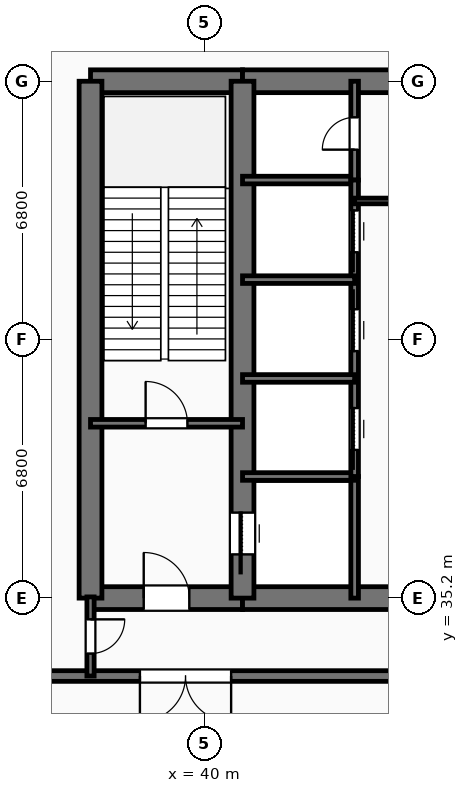
"""IFC4 building model, lengths in metres.
Left out: names, types, materials, properties, quantities, classifications, styles, units other than length and angle.
Written with IfcOpenShell. Run it as: python <this file> out.ifc"""

import sys

from ifc_helpers import new_model, si_unit, direction, frame, frame_2d, origin, place, context, subcontext, project, spatial, rectangle, extrude, element, fill, save


model = new_model("IFC4")
c1 = context("Model", 3, precision=1e-05, world=origin(), true_north=direction((0.0, 1.0)))
c2 = subcontext(c1, "Body", "Model", "MODEL_VIEW")
j1 = project(units=[si_unit("LENGTHUNIT", "METRE"), si_unit("PLANEANGLEUNIT", "RADIAN")], contexts=[c1])
p1 = place(None, origin())
s1 = spatial("IfcSite", under=j1, at=p1, CompositionType="ELEMENT")
p2 = place(p1, origin())
s2 = spatial("IfcBuilding", under=s1, at=p2, CompositionType="ELEMENT")
p3 = place(p2, origin())
s3 = spatial("IfcBuildingStorey", under=s2, at=p3, CompositionType="ELEMENT", Elevation=0.0)
p4 = place(p3, frame((37.0, 35.2, 0.0), z_axis=(0.0, 0.0, 1.0), x_axis=(1.0, 0.0, 0.0)))
e1 = element("IfcWall", 1, at=p4, inside=s3, PredefinedType="SHEAR", context=c2, shape_type="SweptSolid", body=[
    extrude(rectangle(XDim=4.0, YDim=0.6, at=frame_2d((2.0, 0.0))), origin(), (0.0, 0.0, 1.0), 5.72),
])
p5 = place(p4, frame((1.4, 0.0, 0.0)))
e2 = element("IfcOpeningElement", 2, at=p5, cuts=e1, PredefinedType="OPENING", context=c2, shape_type="SweptSolid", body=[
    extrude(rectangle(XDim=1.2, YDim=2.15, at=frame_2d((0.6, 1.075))), frame((0.0, 0.31, 0.0), z_axis=(0.0, -1.0, 0.0), x_axis=(1.0, 0.0, 0.0)), (0.0, 0.0, 1.0), 0.62),
])
p6 = place(p3, frame((41.0, 35.2, 0.0), z_axis=(0.0, 0.0, 1.0), x_axis=(1.0, 0.0, 0.0)))
e3 = element("IfcWall", 3, at=p6, inside=s3, PredefinedType="SHEAR", context=c2, shape_type="SweptSolid", body=[
    extrude(rectangle(XDim=14.0, YDim=0.6, at=frame_2d((7.0, 0.0))), origin(), (0.0, 0.0, 1.0), 5.72),
])
p7 = place(p6, frame((6.1, 0.0, 0.0)))
e4 = element("IfcOpeningElement", 4, at=p7, cuts=e3, PredefinedType="OPENING", context=c2, shape_type="SweptSolid", body=[
    extrude(rectangle(XDim=1.8, YDim=2.25, at=frame_2d((0.9, 1.125))), frame((0.0, 0.31, 0.0), z_axis=(0.0, -1.0, 0.0), x_axis=(1.0, 0.0, 0.0)), (0.0, 0.0, 1.0), 0.62),
])
p8 = place(p3, frame((37.0, 48.8, 0.0), z_axis=(0.0, 0.0, 1.0), x_axis=(1.0, 0.0, 0.0)))
e5 = element("IfcWall", 5, at=p8, inside=s3, PredefinedType="SHEAR", context=c2, shape_type="SweptSolid", body=[
    extrude(rectangle(XDim=4.0, YDim=0.6, at=frame_2d((2.0, 0.0))), origin(), (0.0, 0.0, 1.0), 5.72),
])
p9 = place(p3, frame((41.0, 48.8, 0.0), z_axis=(0.0, 0.0, 1.0), x_axis=(1.0, 0.0, 0.0)))
e6 = element("IfcWall", 6, at=p9, inside=s3, PredefinedType="SHEAR", context=c2, shape_type="SweptSolid", body=[
    extrude(rectangle(XDim=14.0, YDim=0.6, at=frame_2d((7.0, 0.0))), origin(), (0.0, 0.0, 1.0), 5.72),
])
p10 = place(p9, frame((6.1, 0.0, 0.0)))
e7 = element("IfcOpeningElement", 7, at=p10, cuts=e6, PredefinedType="OPENING", context=c2, shape_type="SweptSolid", body=[
    extrude(rectangle(XDim=1.8, YDim=2.25, at=frame_2d((0.9, 1.125))), frame((0.0, 0.31, 0.0), z_axis=(0.0, -1.0, 0.0), x_axis=(1.0, 0.0, 0.0)), (0.0, 0.0, 1.0), 0.62),
])
p11 = place(p3, frame((37.0, 35.2, 0.0), z_axis=(0.0, 0.0, 1.0), x_axis=(0.0, 1.0, 0.0)))
e8 = element("IfcWall", 8, at=p11, inside=s3, PredefinedType="SHEAR", context=c2, shape_type="SweptSolid", body=[
    extrude(rectangle(XDim=13.6, YDim=0.6, at=frame_2d((6.8, 0.0))), origin(), (0.0, 0.0, 1.0), 5.72),
])
p12 = place(p3, frame((41.0, 35.2, 0.0), z_axis=(0.0, 0.0, 1.0), x_axis=(0.0, 1.0, 0.0)))
e9 = element("IfcWall", 9, at=p12, inside=s3, PredefinedType="SHEAR", context=c2, shape_type="SweptSolid", body=[
    extrude(rectangle(XDim=13.6, YDim=0.6, at=frame_2d((6.8, 0.0))), origin(), (0.0, 0.0, 1.0), 5.72),
])
p13 = place(p12, frame((1.15, 0.0, 0.0)))
e10 = element("IfcOpeningElement", 10, at=p13, cuts=e9, PredefinedType="OPENING", context=c2, shape_type="SweptSolid", body=[
    extrude(rectangle(XDim=1.1, YDim=2.2, at=frame_2d((0.55, 1.1))), frame((0.0, 0.31, 0.0), z_axis=(0.0, -1.0, 0.0), x_axis=(1.0, 0.0, 0.0)), (0.0, 0.0, 1.0), 0.62),
])
p14 = place(p3, frame((88.0, 33.15, 0.0), z_axis=(0.0, 0.0, 1.0), x_axis=(-1.0, 0.0, 0.0)))
e11 = element("IfcWall", 11, at=p14, inside=s3, PredefinedType="SOLIDWALL", context=c2, shape_type="SweptSolid", body=[
    extrude(rectangle(XDim=80.0, YDim=0.28, at=frame_2d((40.0, 0.0))), origin(), (0.0, 0.0, 1.0), 5.72),
])
p15 = place(p14, frame((47.3, 0.0, 0.0)))
e12 = element("IfcOpeningElement", 12, at=p15, cuts=e11, PredefinedType="OPENING", context=c2, shape_type="SweptSolid", body=[
    extrude(rectangle(XDim=2.4, YDim=2.6, at=frame_2d((1.2, 1.3))), frame((0.0, 0.15, 0.0), z_axis=(0.0, -1.0, 0.0), x_axis=(1.0, 0.0, 0.0)), (0.0, 0.0, 1.0), 0.3),
])
p16 = place(p14, frame((38.8, 0.0, 0.0)))
e13 = element("IfcOpeningElement", 13, at=p16, cuts=e11, PredefinedType="OPENING", context=c2, shape_type="SweptSolid", body=[
    extrude(rectangle(XDim=2.4, YDim=2.6, at=frame_2d((1.2, 1.3))), frame((0.0, 0.15, 0.0), z_axis=(0.0, -1.0, 0.0), x_axis=(1.0, 0.0, 0.0)), (0.0, 0.0, 1.0), 0.3),
])
p17 = place(p14, frame((30.3, 0.0, 0.0)))
e14 = element("IfcOpeningElement", 14, at=p17, cuts=e11, PredefinedType="OPENING", context=c2, shape_type="SweptSolid", body=[
    extrude(rectangle(XDim=2.4, YDim=2.6, at=frame_2d((1.2, 1.3))), frame((0.0, 0.15, 0.0), z_axis=(0.0, -1.0, 0.0), x_axis=(1.0, 0.0, 0.0)), (0.0, 0.0, 1.0), 0.3),
])
p18 = place(p3, frame((37.0, 39.8, 0.0), z_axis=(0.0, 0.0, 1.0), x_axis=(1.0, 0.0, 0.0)))
e15 = element("IfcWall", 15, at=p18, inside=s3, PredefinedType="SOLIDWALL", context=c2, shape_type="SweptSolid", body=[
    extrude(rectangle(XDim=4.0, YDim=0.2, at=frame_2d((2.0, 0.0))), origin(), (0.0, 0.0, 1.0), 4.92),
])
p19 = place(p18, frame((1.45, 0.0, 0.0)))
e16 = element("IfcOpeningElement", 16, at=p19, cuts=e15, PredefinedType="OPENING", context=c2, shape_type="SweptSolid", body=[
    extrude(rectangle(XDim=1.1, YDim=2.15, at=frame_2d((0.55, 1.075))), frame((0.0, 0.11, 0.0), z_axis=(0.0, -1.0, 0.0), x_axis=(1.0, 0.0, 0.0)), (0.0, 0.0, 1.0), 0.22),
])
p20 = place(p3, frame((43.95, 35.2, 0.0), z_axis=(0.0, 0.0, 1.0), x_axis=(0.0, 1.0, 0.0)))
e17 = element("IfcWall", 17, at=p20, inside=s3, PredefinedType="SOLIDWALL", context=c2, shape_type="SweptSolid", body=[
    extrude(rectangle(XDim=3.2, YDim=0.2, at=frame_2d((1.6, 0.0))), origin(), (0.0, 0.0, 1.0), 4.92),
])
for number, where, z_axis, x_axis in (
    (18, (41.0, 38.4, 0.0), (0.0, 0.0, 1.0), (1.0, 0.0, 0.0)),
    (19, (41.0, 46.2, 0.0), (0.0, 0.0, 1.0), (1.0, 0.0, 0.0)),
):
    element("IfcWall", number, at=place(p3, frame(where, z_axis=z_axis, x_axis=x_axis)), inside=s3, PredefinedType="SOLIDWALL", context=c2, shape_type="SweptSolid", body=[
        extrude(rectangle(XDim=2.95, YDim=0.2, at=frame_2d((1.475, 0.0))), origin(), (0.0, 0.0, 1.0), 4.92),
    ])
p21 = place(p3, frame((43.95, 46.2, 0.0), z_axis=(0.0, 0.0, 1.0), x_axis=(0.0, 1.0, 0.0)))
e20 = element("IfcWall", 20, at=p21, inside=s3, PredefinedType="SOLIDWALL", context=c2, shape_type="SweptSolid", body=[
    extrude(rectangle(XDim=2.6, YDim=0.2, at=frame_2d((1.3, 0.0))), origin(), (0.0, 0.0, 1.0), 4.92),
])
p22 = place(p21, frame((0.8, 0.0, 0.0)))
e21 = element("IfcOpeningElement", 21, at=p22, cuts=e20, PredefinedType="OPENING", context=c2, shape_type="SweptSolid", body=[
    extrude(rectangle(XDim=0.85, YDim=2.15, at=frame_2d((0.425, 1.075))), frame((0.0, 0.11, 0.0), z_axis=(0.0, -1.0, 0.0), x_axis=(1.0, 0.0, 0.0)), (0.0, 0.0, 1.0), 0.22),
])
p23 = place(p3, frame((43.95, 38.4, 0.0), z_axis=(0.0, 0.0, 1.0), x_axis=(0.0, 1.0, 0.0)))
e22 = element("IfcWall", 22, at=p23, inside=s3, PredefinedType="SOLIDWALL", context=c2, shape_type="SweptSolid", body=[
    extrude(rectangle(XDim=7.8, YDim=0.2, at=frame_2d((3.9, 0.0))), origin(), (0.0, 0.0, 1.0), 4.92),
])
p24 = place(p23, frame((0.7, 0.0, 0.0)))
e23 = element("IfcOpeningElement", 23, at=p24, cuts=e22, PredefinedType="OPENING", context=c2, shape_type="SweptSolid", body=[
    extrude(rectangle(XDim=1.1, YDim=2.2, at=frame_2d((0.55, 1.1))), frame((0.0, 0.11, 0.0), z_axis=(0.0, -1.0, 0.0), x_axis=(1.0, 0.0, 0.0)), (0.0, 0.0, 1.0), 0.22),
])
p25 = place(p23, frame((3.3, 0.0, 0.0)))
e24 = element("IfcOpeningElement", 24, at=p25, cuts=e22, PredefinedType="OPENING", context=c2, shape_type="SweptSolid", body=[
    extrude(rectangle(XDim=1.1, YDim=2.2, at=frame_2d((0.55, 1.1))), frame((0.0, 0.11, 0.0), z_axis=(0.0, -1.0, 0.0), x_axis=(1.0, 0.0, 0.0)), (0.0, 0.0, 1.0), 0.22),
])
p26 = place(p23, frame((5.9, 0.0, 0.0)))
e25 = element("IfcOpeningElement", 25, at=p26, cuts=e22, PredefinedType="OPENING", context=c2, shape_type="SweptSolid", body=[
    extrude(rectangle(XDim=1.1, YDim=2.2, at=frame_2d((0.55, 1.1))), frame((0.0, 0.11, 0.0), z_axis=(0.0, -1.0, 0.0), x_axis=(1.0, 0.0, 0.0)), (0.0, 0.0, 1.0), 0.22),
])
for number, where, z_axis, x_axis in (
    (26, (41.0, 40.98, 0.0), (0.0, 0.0, 1.0), (1.0, 0.0, 0.0)),
    (27, (41.0, 43.58, 0.0), (0.0, 0.0, 1.0), (1.0, 0.0, 0.0)),
):
    element("IfcWall", number, at=place(p3, frame(where, z_axis=z_axis, x_axis=x_axis)), inside=s3, PredefinedType="SOLIDWALL", context=c2, shape_type="SweptSolid", body=[
        extrude(rectangle(XDim=2.95, YDim=0.2, at=frame_2d((1.475, 0.0))), origin(), (0.0, 0.0, 1.0), 4.92),
    ])
p27 = place(p3, frame((43.95, 45.65, 0.0), z_axis=(0.0, 0.0, 1.0), x_axis=(1.0, 0.0, 0.0)))
e28 = element("IfcWall", 28, at=p27, inside=s3, PredefinedType="PARTITIONING", context=c2, shape_type="SweptSolid", body=[
    extrude(rectangle(XDim=2.9, YDim=0.15, at=frame_2d((1.45, 0.0))), origin(), (0.0, 0.0, 1.0), 4.92),
])
p28 = place(p3, frame((37.0, 35.232, 0.0), z_axis=(0.0, 0.0, 1.0), x_axis=(0.0, -1.0, 0.0)))
e29 = element("IfcWall", 29, at=p28, inside=s3, PredefinedType="PARTITIONING", context=c2, shape_type="SweptSolid", body=[
    extrude(rectangle(XDim=2.082, YDim=0.19, at=frame_2d((1.041, 0.0))), origin(), (0.0, 0.0, 1.0), 4.92),
])
p29 = place(p28, frame((0.591, 0.0, 0.0)))
e30 = element("IfcOpeningElement", 30, at=p29, cuts=e29, PredefinedType="OPENING", context=c2, shape_type="SweptSolid", body=[
    extrude(rectangle(XDim=0.9, YDim=2.15, at=frame_2d((0.45, 1.075))), frame((0.0, 0.105, 0.0), z_axis=(0.0, -1.0, 0.0), x_axis=(1.0, 0.0, 0.0)), (0.0, 0.0, 1.0), 0.21),
])
p30 = place(p15, origin())
e31 = element("IfcDoor", 31, at=p30, inside=s3, OperationType="DOUBLE_DOOR_SINGLE_SWING", PredefinedType="DOOR", context=c2, shape_type="SweptSolid", body=[
    extrude(rectangle(XDim=2.4, YDim=2.6, at=frame_2d((1.2, 1.3))), frame((0.0, 0.025, 0.0), z_axis=(0.0, -1.0, 0.0), x_axis=(1.0, 0.0, 0.0)), (0.0, 0.0, 1.0), 0.05),
])
fill(e12, e31)
p31 = place(p13, origin())
e32 = element("IfcDoor", 32, at=p31, inside=s3, OperationType="SLIDING_TO_LEFT", PredefinedType="DOOR", context=c2, shape_type="SweptSolid", body=[
    extrude(rectangle(XDim=1.1, YDim=2.2, at=frame_2d((0.55, 1.1))), frame((0.0, 0.025, 0.0), z_axis=(0.0, -1.0, 0.0), x_axis=(1.0, 0.0, 0.0)), (0.0, 0.0, 1.0), 0.05),
])
fill(e10, e32)
p32 = place(p5, origin())
e33 = element("IfcDoor", 33, at=p32, inside=s3, OperationType="SINGLE_SWING_LEFT", PredefinedType="DOOR", context=c2, shape_type="SweptSolid", body=[
    extrude(rectangle(XDim=1.2, YDim=2.15, at=frame_2d((0.6, 1.075))), frame((0.0, 0.025, 0.0), z_axis=(0.0, -1.0, 0.0), x_axis=(1.0, 0.0, 0.0)), (0.0, 0.0, 1.0), 0.05),
])
fill(e2, e33)
p33 = place(p19, origin())
e34 = element("IfcDoor", 34, at=p33, inside=s3, OperationType="SINGLE_SWING_LEFT", PredefinedType="DOOR", context=c2, shape_type="SweptSolid", body=[
    extrude(rectangle(XDim=1.1, YDim=2.15, at=frame_2d((0.55, 1.075))), frame((0.0, 0.025, 0.0), z_axis=(0.0, -1.0, 0.0), x_axis=(1.0, 0.0, 0.0)), (0.0, 0.0, 1.0), 0.05),
])
fill(e16, e34)
p34 = place(p22, origin())
e35 = element("IfcDoor", 35, at=p34, inside=s3, OperationType="SINGLE_SWING_LEFT", PredefinedType="DOOR", context=c2, shape_type="SweptSolid", body=[
    extrude(rectangle(XDim=0.85, YDim=2.15, at=frame_2d((0.425, 1.075))), frame((0.0, 0.025, 0.0), z_axis=(0.0, -1.0, 0.0), x_axis=(1.0, 0.0, 0.0)), (0.0, 0.0, 1.0), 0.05),
])
fill(e21, e35)
p35 = place(p24, origin())
e36 = element("IfcDoor", 36, at=p35, inside=s3, OperationType="SLIDING_TO_LEFT", PredefinedType="DOOR", context=c2, shape_type="SweptSolid", body=[
    extrude(rectangle(XDim=1.1, YDim=2.2, at=frame_2d((0.55, 1.1))), frame((0.0, 0.025, 0.0), z_axis=(0.0, -1.0, 0.0), x_axis=(1.0, 0.0, 0.0)), (0.0, 0.0, 1.0), 0.05),
])
fill(e23, e36)
p36 = place(p25, origin())
e37 = element("IfcDoor", 37, at=p36, inside=s3, OperationType="SLIDING_TO_RIGHT", PredefinedType="DOOR", context=c2, shape_type="SweptSolid", body=[
    extrude(rectangle(XDim=1.1, YDim=2.2, at=frame_2d((0.55, 1.1))), frame((0.0, 0.025, 0.0), z_axis=(0.0, -1.0, 0.0), x_axis=(1.0, 0.0, 0.0)), (0.0, 0.0, 1.0), 0.05),
])
fill(e24, e37)
p37 = place(p26, origin())
e38 = element("IfcDoor", 38, at=p37, inside=s3, OperationType="SLIDING_TO_LEFT", PredefinedType="DOOR", context=c2, shape_type="SweptSolid", body=[
    extrude(rectangle(XDim=1.1, YDim=2.2, at=frame_2d((0.55, 1.1))), frame((0.0, 0.025, 0.0), z_axis=(0.0, -1.0, 0.0), x_axis=(1.0, 0.0, 0.0)), (0.0, 0.0, 1.0), 0.05),
])
fill(e25, e38)
p38 = place(p29, origin())
e39 = element("IfcDoor", 39, at=p38, inside=s3, OperationType="SINGLE_SWING_LEFT", PredefinedType="DOOR", context=c2, shape_type="SweptSolid", body=[
    extrude(rectangle(XDim=0.9, YDim=2.15, at=frame_2d((0.45, 1.075))), frame((0.0, 0.025, 0.0), z_axis=(0.0, -1.0, 0.0), x_axis=(1.0, 0.0, 0.0)), (0.0, 0.0, 1.0), 0.05),
])
fill(e30, e39)
save(model, sys.argv[1])
